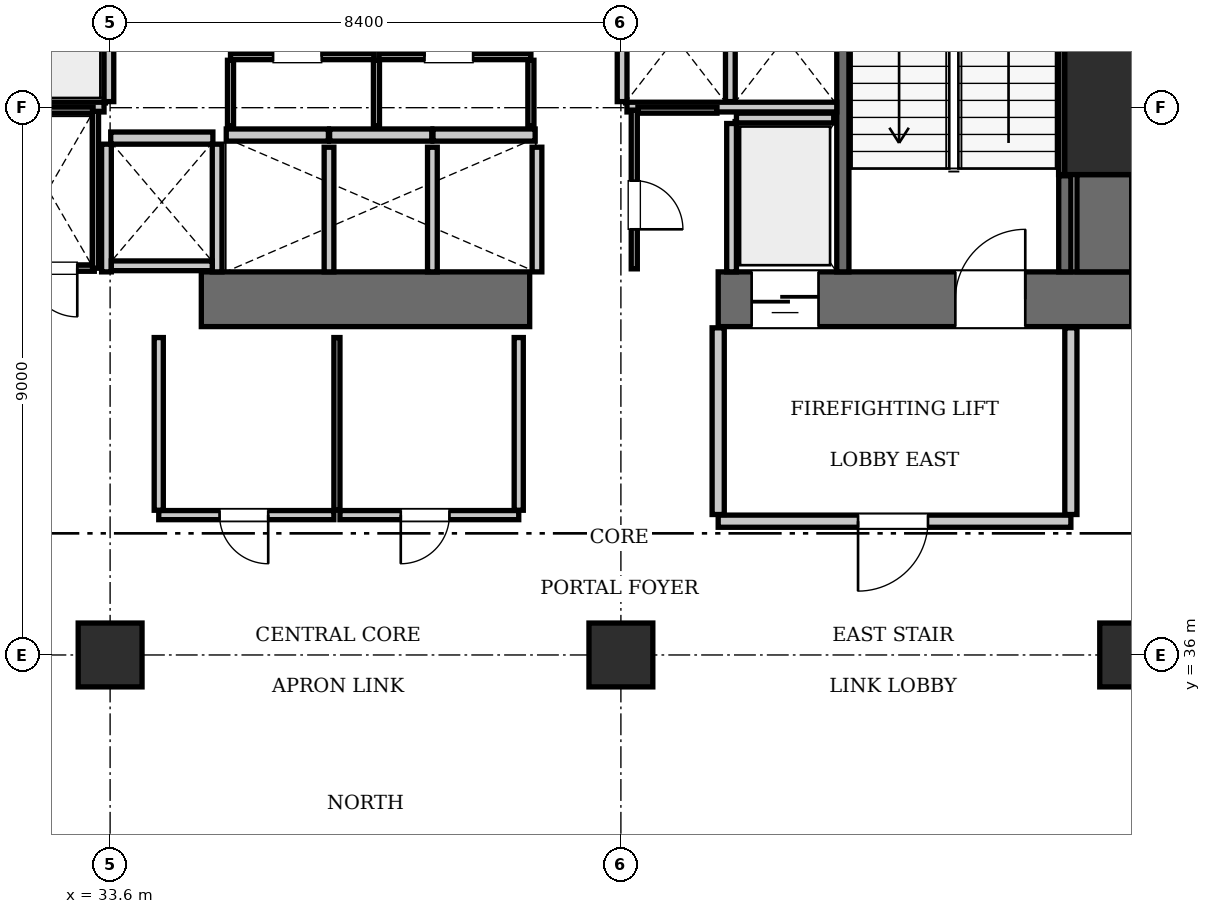
"""IFC4 building model, lengths in metres.
Left out: names, types, materials, properties, quantities, classifications, styles, units other than length and angle.
Written with IfcOpenShell. Run it as: python <this file> out.ifc"""

import sys

from ifc_helpers import new_model, si_unit, direction, frame, frame_2d, origin, origin_2d, place, context, subcontext, project, spatial, rectangle, extrude, element, fill, save


model = new_model("IFC4")
c1 = context("Model", 3, precision=1e-05, world=origin(), true_north=direction((0.0, 1.0)))
c2 = subcontext(c1, "Body", "Model", "MODEL_VIEW")
j1 = project(units=[si_unit("LENGTHUNIT", "METRE"), si_unit("PLANEANGLEUNIT", "RADIAN")], contexts=[c1])
p1 = place(None, origin())
s1 = spatial("IfcSite", under=j1, at=p1, CompositionType="ELEMENT")
p2 = place(p1, origin())
s2 = spatial("IfcBuilding", under=s1, at=p2, CompositionType="ELEMENT")
p3 = place(p2, frame((0.0, 0.0, 96.25)))
s3 = spatial("IfcBuildingStorey", under=s2, at=p3, CompositionType="ELEMENT", Elevation=96.25)
p4 = place(p3, frame((50.4, 45.0, 0.0), z_axis=(0.0, 0.0, 1.0), x_axis=(1.0, 0.0, 0.0)))
e1 = element("IfcColumn", 1, at=p4, inside=s3, PredefinedType="COLUMN", context=c2, shape_type="SweptSolid", body=[
    extrude(rectangle(XDim=2.2, YDim=2.2, at=origin_2d()), origin(), (0.0, 0.0, 1.0), 3.85),
])
p5 = place(p3, frame((35.1, 41.85, 0.0), z_axis=(0.0, 0.0, 1.0), x_axis=(1.0, 0.0, 0.0)))
e2 = element("IfcWall", 2, at=p5, inside=s3, PredefinedType="SHEAR", context=c2, shape_type="SweptSolid", body=[
    extrude(rectangle(XDim=5.4, YDim=0.9, at=frame_2d((2.7, 0.0))), origin(), (0.0, 0.0, 1.0), 3.85),
])
p6 = place(p3, frame((43.6, 41.85, 0.0), z_axis=(0.0, 0.0, 1.0), x_axis=(1.0, 0.0, 0.0)))
e3 = element("IfcWall", 3, at=p6, inside=s3, PredefinedType="SHEAR", context=c2, shape_type="SweptSolid", body=[
    extrude(rectangle(XDim=6.8, YDim=0.9, at=frame_2d((3.4, 0.0))), origin(), (0.0, 0.0, 1.0), 3.85),
])
p7 = place(p6, frame((3.9, 0.0, 0.0)))
e4 = element("IfcOpeningElement", 4, at=p7, cuts=e3, PredefinedType="OPENING", context=c2, shape_type="SweptSolid", body=[
    extrude(rectangle(XDim=1.15, YDim=2.15, at=frame_2d((0.575, 1.075))), frame((0.0, 0.46, 0.0), z_axis=(0.0, -1.0, 0.0), x_axis=(1.0, 0.0, 0.0)), (0.0, 0.0, 1.0), 0.92),
])
p8 = place(p6, frame((0.55, 0.0, 0.0)))
e5 = element("IfcOpeningElement", 5, at=p8, cuts=e3, PredefinedType="OPENING", context=c2, shape_type="SweptSolid", body=[
    extrude(rectangle(XDim=1.1, YDim=2.2, at=frame_2d((0.55, 1.1))), frame((0.0, 0.46, 0.0), z_axis=(0.0, -1.0, 0.0), x_axis=(1.0, 0.0, 0.0)), (0.0, 0.0, 1.0), 0.92),
])
p9 = place(p3, frame((49.95, 42.3, 0.0), z_axis=(0.0, 0.0, 1.0), x_axis=(0.0, 1.0, 0.0)))
e6 = element("IfcWall", 6, at=p9, inside=s3, PredefinedType="SHEAR", context=c2, shape_type="SweptSolid", body=[
    extrude(rectangle(XDim=1.6, YDim=0.9, at=frame_2d((0.8, 0.0))), origin(), (0.0, 0.0, 1.0), 3.85),
])
for number, where, z_axis, x_axis in (
    (7, (33.6, 36.0, 0.0), (0.0, 0.0, 1.0), (1.0, 0.0, 0.0)),
    (8, (42.0, 36.0, 0.0), (0.0, 0.0, 1.0), (1.0, 0.0, 0.0)),
    (9, (50.4, 36.0, 0.0), (0.0, 0.0, 1.0), (1.0, 0.0, 0.0)),
):
    element("IfcColumn", number, at=place(p3, frame(where, z_axis=z_axis, x_axis=x_axis)), inside=s3, PredefinedType="COLUMN", context=c2, shape_type="SweptSolid", body=[
        extrude(rectangle(XDim=1.05, YDim=1.05, at=origin_2d()), origin(), (0.0, 0.0, 1.0), 3.85),
    ])
p10 = place(p3, frame((45.65, 42.3, 0.0), z_axis=(0.0, 0.0, 1.0), x_axis=(0.0, 1.0, 0.0)))
e10 = element("IfcWall", 10, at=p10, inside=s3, PredefinedType="SOLIDWALL", context=c2, shape_type="SweptSolid", body=[
    extrude(rectangle(XDim=8.85, YDim=0.2, at=frame_2d((4.425, 0.0))), origin(), (0.0, 0.0, 1.0), 3.61),
])
p11 = place(p3, frame((49.3, 42.3, 0.0), z_axis=(0.0, 0.0, 1.0), x_axis=(0.0, 1.0, 0.0)))
e11 = element("IfcWall", 11, at=p11, inside=s3, PredefinedType="SOLIDWALL", context=c2, shape_type="SweptSolid", body=[
    extrude(rectangle(XDim=1.58, YDim=0.2, at=frame_2d((0.79, 0.0))), origin(), (0.0, 0.0, 1.0), 3.61),
])
p12 = place(p3, frame((49.248, 43.9, 0.0), z_axis=(0.0, 0.0, 1.0), x_axis=(0.0, 1.0, 0.0)))
e12 = element("IfcWall", 12, at=p12, inside=s3, PredefinedType="SOLIDWALL", context=c2, shape_type="SweptSolid", body=[
    extrude(rectangle(XDim=2.2, YDim=0.1, at=frame_2d((1.1, 0.0))), origin(), (0.0, 0.0, 1.0), 3.61),
])
for number, where, z_axis, x_axis in (
    (13, (35.51, 44.55, 0.0), (0.0, 0.0, 1.0), (1.0, 0.0, 0.0)),
    (14, (37.21, 44.55, 0.0), (0.0, 0.0, 1.0), (1.0, 0.0, 0.0)),
):
    element("IfcWall", number, at=place(p3, frame(where, z_axis=z_axis, x_axis=x_axis)), inside=s3, PredefinedType="SOLIDWALL", context=c2, shape_type="SweptSolid", body=[
        extrude(rectangle(XDim=1.68, YDim=0.2, at=frame_2d((0.84, 0.0))), origin(), (0.0, 0.0, 1.0), 3.61),
    ])
p13 = place(p3, frame((38.91, 44.55, 0.0), z_axis=(0.0, 0.0, 1.0), x_axis=(1.0, 0.0, 0.0)))
e15 = element("IfcWall", 15, at=p13, inside=s3, PredefinedType="SOLIDWALL", context=c2, shape_type="SweptSolid", body=[
    extrude(rectangle(XDim=1.68, YDim=0.2, at=frame_2d((0.84, 0.0))), origin(), (0.0, 0.0, 1.0), 3.61),
])
p14 = place(p3, frame((33.61, 44.5, 0.0), z_axis=(0.0, 0.0, 1.0), x_axis=(1.0, 0.0, 0.0)))
e16 = element("IfcWall", 16, at=p14, inside=s3, PredefinedType="SOLIDWALL", context=c2, shape_type="SweptSolid", body=[
    extrude(rectangle(XDim=1.68, YDim=0.2, at=frame_2d((0.84, 0.0))), origin(), (0.0, 0.0, 1.0), 3.61),
])
p15 = place(p3, frame((43.9, 44.83, 0.0), z_axis=(0.0, 0.0, 1.0), x_axis=(1.0, 0.0, 0.0)))
e17 = element("IfcWall", 17, at=p15, inside=s3, PredefinedType="SOLIDWALL", context=c2, shape_type="SweptSolid", body=[
    extrude(rectangle(XDim=1.6, YDim=0.16, at=frame_2d((0.8, 0.0))), origin(), (0.0, 0.0, 1.0), 3.61),
])
p16 = place(p3, frame((43.82, 42.3, 0.0), z_axis=(0.0, 0.0, 1.0), x_axis=(0.0, 1.0, 0.0)))
e18 = element("IfcWall", 18, at=p16, inside=s3, PredefinedType="SOLIDWALL", context=c2, shape_type="SweptSolid", body=[
    extrude(rectangle(XDim=2.44, YDim=0.16, at=frame_2d((1.22, 0.0))), origin(), (0.0, 0.0, 1.0), 3.61),
])
p17 = place(p3, frame((33.58, 45.1, 0.0), z_axis=(0.0, 0.0, 1.0), x_axis=(0.0, 1.0, 0.0)))
e19 = element("IfcWall", 19, at=p17, inside=s3, PredefinedType="SOLIDWALL", context=c2, shape_type="SweptSolid", body=[
    extrude(rectangle(XDim=1.95, YDim=0.16, at=frame_2d((0.975, 0.0))), origin(), (0.0, 0.0, 1.0), 3.61),
])
p18 = place(p3, frame((30.05, 45.01, 0.0), z_axis=(0.0, 0.0, 1.0), x_axis=(1.0, 0.0, 0.0)))
e20 = element("IfcWall", 20, at=p18, inside=s3, PredefinedType="SOLIDWALL", context=c2, shape_type="SweptSolid", body=[
    extrude(rectangle(XDim=3.45, YDim=0.16, at=frame_2d((1.725, 0.0))), origin(), (0.0, 0.0, 1.0), 3.61),
])
for number, where, z_axis, x_axis in (
    (21, (42.02, 45.1, 0.0), (0.0, 0.0, 1.0), (0.0, 1.0, 0.0)),
    (22, (43.8, 45.1, 0.0), (0.0, 0.0, 1.0), (0.0, 1.0, 0.0)),
):
    element("IfcWall", number, at=place(p3, frame(where, z_axis=z_axis, x_axis=x_axis)), inside=s3, PredefinedType="SOLIDWALL", context=c2, shape_type="SweptSolid", body=[
        extrude(rectangle(XDim=1.95, YDim=0.16, at=frame_2d((0.975, 0.0))), origin(), (0.0, 0.0, 1.0), 3.61),
    ])
p19 = place(p3, frame((42.1, 45.01, 0.0), z_axis=(0.0, 0.0, 1.0), x_axis=(1.0, 0.0, 0.0)))
e23 = element("IfcWall", 23, at=p19, inside=s3, PredefinedType="SOLIDWALL", context=c2, shape_type="SweptSolid", body=[
    extrude(rectangle(XDim=3.45, YDim=0.16, at=frame_2d((1.725, 0.0))), origin(), (0.0, 0.0, 1.0), 3.61),
])
for number, where, z_axis, x_axis in (
    (24, (37.2, 42.3, 0.0), (0.0, 0.0, 1.0), (0.0, 1.0, 0.0)),
    (25, (38.9, 42.3, 0.0), (0.0, 0.0, 1.0), (0.0, 1.0, 0.0)),
    (26, (40.62, 42.3, 0.0), (0.0, 0.0, 1.0), (0.0, 1.0, 0.0)),
):
    element("IfcWall", number, at=place(p3, frame(where, z_axis=z_axis, x_axis=x_axis)), inside=s3, PredefinedType="SOLIDWALL", context=c2, shape_type="SweptSolid", body=[
        extrude(rectangle(XDim=2.05, YDim=0.16, at=frame_2d((1.025, 0.0))), origin(), (0.0, 0.0, 1.0), 3.61),
    ])
for number, where, z_axis, x_axis in (
    (27, (33.54, 42.3, 0.0), (0.0, 0.0, 1.0), (0.0, 1.0, 0.0)),
    (28, (35.36, 42.3, 0.0), (0.0, 0.0, 1.0), (0.0, 1.0, 0.0)),
):
    element("IfcWall", number, at=place(p3, frame(where, z_axis=z_axis, x_axis=x_axis)), inside=s3, PredefinedType="SOLIDWALL", context=c2, shape_type="SweptSolid", body=[
        extrude(rectangle(XDim=2.1, YDim=0.16, at=frame_2d((1.05, 0.0))), origin(), (0.0, 0.0, 1.0), 3.61),
    ])
p20 = place(p3, frame((33.62, 42.4, 0.0), z_axis=(0.0, 0.0, 1.0), x_axis=(1.0, 0.0, 0.0)))
e29 = element("IfcWall", 29, at=p20, inside=s3, PredefinedType="SOLIDWALL", context=c2, shape_type="SweptSolid", body=[
    extrude(rectangle(XDim=1.66, YDim=0.16, at=frame_2d((0.83, 0.0))), origin(), (0.0, 0.0, 1.0), 3.61),
])
p21 = place(p3, frame((43.6, 38.2, 0.0), z_axis=(0.0, 0.0, 1.0), x_axis=(1.0, 0.0, 0.0)))
e30 = element("IfcWall", 30, at=p21, inside=s3, PredefinedType="PARTITIONING", context=c2, shape_type="SweptSolid", body=[
    extrude(rectangle(XDim=5.8, YDim=0.2, at=frame_2d((2.9, 0.0))), origin(), (0.0, 0.0, 1.0), 3.61),
])
p22 = place(p21, frame((2.3, 0.0, 0.0)))
e31 = element("IfcOpeningElement", 31, at=p22, cuts=e30, PredefinedType="OPENING", context=c2, shape_type="SweptSolid", body=[
    extrude(rectangle(XDim=1.15, YDim=2.15, at=frame_2d((0.575, 1.075))), frame((0.0, 0.11, 0.0), z_axis=(0.0, -1.0, 0.0), x_axis=(1.0, 0.0, 0.0)), (0.0, 0.0, 1.0), 0.22),
])
for number, where, z_axis, x_axis in (
    (32, (43.6, 38.31, 0.0), (0.0, 0.0, 1.0), (0.0, 1.0, 0.0)),
    (33, (49.4, 38.31, 0.0), (0.0, 0.0, 1.0), (0.0, 1.0, 0.0)),
):
    element("IfcWall", number, at=place(p3, frame(where, z_axis=z_axis, x_axis=x_axis)), inside=s3, PredefinedType="PARTITIONING", context=c2, shape_type="SweptSolid", body=[
        extrude(rectangle(XDim=3.07, YDim=0.2, at=frame_2d((1.535, 0.0))), origin(), (0.0, 0.0, 1.0), 3.61),
    ])
p23 = place(p3, frame((32.02, 42.36, 0.0), z_axis=(0.0, 0.0, 1.0), x_axis=(1.0, 0.0, 0.0)))
e34 = element("IfcWall", 34, at=p23, inside=s3, PredefinedType="PARTITIONING", context=c2, shape_type="SweptSolid", body=[
    extrude(rectangle(XDim=1.32, YDim=0.1, at=frame_2d((0.66, 0.0))), origin(), (0.0, 0.0, 1.0), 3.61),
])
p24 = place(p23, frame((0.24, 0.0, 0.0)))
e35 = element("IfcOpeningElement", 35, at=p24, cuts=e34, PredefinedType="OPENING", context=c2, shape_type="SweptSolid", body=[
    extrude(rectangle(XDim=0.8, YDim=2.05, at=frame_2d((0.4, 1.025))), frame((0.0, 0.06, 0.0), z_axis=(0.0, -1.0, 0.0), x_axis=(1.0, 0.0, 0.0)), (0.0, 0.0, 1.0), 0.12),
])
p25 = place(p3, frame((31.84, 44.96, 0.0), z_axis=(0.0, 0.0, 1.0), x_axis=(1.0, 0.0, 0.0)))
e36 = element("IfcWall", 36, at=p25, inside=s3, PredefinedType="PARTITIONING", context=c2, shape_type="SweptSolid", body=[
    extrude(rectangle(XDim=1.48, YDim=0.1, at=frame_2d((0.74, 0.0))), origin(), (0.0, 0.0, 1.0), 3.61),
])
p26 = place(p3, frame((33.36, 42.36, 0.0), z_axis=(0.0, 0.0, 1.0), x_axis=(0.0, 1.0, 0.0)))
e37 = element("IfcWall", 37, at=p26, inside=s3, PredefinedType="PARTITIONING", context=c2, shape_type="SweptSolid", body=[
    extrude(rectangle(XDim=2.58, YDim=0.1, at=frame_2d((1.29, 0.0))), origin(), (0.0, 0.0, 1.0), 3.61),
])
p27 = place(p3, frame((35.58, 45.84, 0.0), z_axis=(0.0, 0.0, 1.0), x_axis=(1.0, 0.0, 0.0)))
e38 = element("IfcWall", 38, at=p27, inside=s3, PredefinedType="PARTITIONING", context=c2, shape_type="SweptSolid", body=[
    extrude(rectangle(XDim=2.36, YDim=0.1, at=frame_2d((1.18, 0.0))), origin(), (0.0, 0.0, 1.0), 3.61),
])
p28 = place(p27, frame((0.7, 0.0, 0.0)))
e39 = element("IfcOpeningElement", 39, at=p28, cuts=e38, PredefinedType="OPENING", context=c2, shape_type="SweptSolid", body=[
    extrude(rectangle(XDim=0.8, YDim=2.05, at=frame_2d((0.4, 1.025))), frame((0.0, 0.06, 0.0), z_axis=(0.0, -1.0, 0.0), x_axis=(1.0, 0.0, 0.0)), (0.0, 0.0, 1.0), 0.12),
])
p29 = place(p3, frame((38.02, 45.84, 0.0), z_axis=(0.0, 0.0, 1.0), x_axis=(1.0, 0.0, 0.0)))
e40 = element("IfcWall", 40, at=p29, inside=s3, PredefinedType="PARTITIONING", context=c2, shape_type="SweptSolid", body=[
    extrude(rectangle(XDim=2.5, YDim=0.1, at=frame_2d((1.25, 0.0))), origin(), (0.0, 0.0, 1.0), 3.61),
])
p30 = place(p29, frame((0.75, 0.0, 0.0)))
e41 = element("IfcOpeningElement", 41, at=p30, cuts=e40, PredefinedType="OPENING", context=c2, shape_type="SweptSolid", body=[
    extrude(rectangle(XDim=0.8, YDim=2.05, at=frame_2d((0.4, 1.025))), frame((0.0, 0.06, 0.0), z_axis=(0.0, -1.0, 0.0), x_axis=(1.0, 0.0, 0.0)), (0.0, 0.0, 1.0), 0.12),
])
for number, where, z_axis, x_axis in (
    (42, (35.58, 44.7, 0.0), (0.0, 0.0, 1.0), (0.0, 1.0, 0.0)),
    (43, (37.98, 44.7, 0.0), (0.0, 0.0, 1.0), (0.0, 1.0, 0.0)),
    (44, (40.52, 44.7, 0.0), (0.0, 0.0, 1.0), (0.0, 1.0, 0.0)),
):
    element("IfcWall", number, at=place(p3, frame(where, z_axis=z_axis, x_axis=x_axis)), inside=s3, PredefinedType="PARTITIONING", context=c2, shape_type="SweptSolid", body=[
        extrude(rectangle(XDim=1.08, YDim=0.1, at=frame_2d((0.54, 0.0))), origin(), (0.0, 0.0, 1.0), 3.61),
    ])
p31 = place(p3, frame((42.22, 42.35, 0.0), z_axis=(0.0, 0.0, 1.0), x_axis=(0.0, 1.0, 0.0)))
e45 = element("IfcWall", 45, at=p31, inside=s3, PredefinedType="PARTITIONING", context=c2, shape_type="SweptSolid", body=[
    extrude(rectangle(XDim=2.61, YDim=0.1, at=frame_2d((1.305, 0.0))), origin(), (0.0, 0.0, 1.0), 3.61),
])
p32 = place(p31, frame((0.65, 0.0, 0.0)))
e46 = element("IfcOpeningElement", 46, at=p32, cuts=e45, PredefinedType="OPENING", context=c2, shape_type="SweptSolid", body=[
    extrude(rectangle(XDim=0.8, YDim=2.05, at=frame_2d((0.4, 1.025))), frame((0.0, 0.06, 0.0), z_axis=(0.0, -1.0, 0.0), x_axis=(1.0, 0.0, 0.0)), (0.0, 0.0, 1.0), 0.12),
])
p33 = place(p3, frame((42.28, 44.96, 0.0), z_axis=(0.0, 0.0, 1.0), x_axis=(1.0, 0.0, 0.0)))
e47 = element("IfcWall", 47, at=p33, inside=s3, PredefinedType="PARTITIONING", context=c2, shape_type="SweptSolid", body=[
    extrude(rectangle(XDim=1.3, YDim=0.1, at=frame_2d((0.65, 0.0))), origin(), (0.0, 0.0, 1.0), 3.61),
])
p34 = place(p3, frame((34.4, 38.3, 0.0), z_axis=(0.0, 0.0, 1.0), x_axis=(1.0, 0.0, 0.0)))
e48 = element("IfcWall", 48, at=p34, inside=s3, PredefinedType="PARTITIONING", context=c2, shape_type="SweptSolid", body=[
    extrude(rectangle(XDim=2.88, YDim=0.15, at=frame_2d((1.44, 0.0))), origin(), (0.0, 0.0, 1.0), 3.61),
])
p35 = place(p34, frame((1.0, 0.0, 0.0)))
e49 = element("IfcOpeningElement", 49, at=p35, cuts=e48, PredefinedType="OPENING", context=c2, shape_type="SweptSolid", body=[
    extrude(rectangle(XDim=0.8, YDim=2.05, at=frame_2d((0.4, 1.025))), frame((0.0, 0.085, 0.0), z_axis=(0.0, -1.0, 0.0), x_axis=(1.0, 0.0, 0.0)), (0.0, 0.0, 1.0), 0.17),
])
p36 = place(p3, frame((37.38, 38.3, 0.0), z_axis=(0.0, 0.0, 1.0), x_axis=(1.0, 0.0, 0.0)))
e50 = element("IfcWall", 50, at=p36, inside=s3, PredefinedType="PARTITIONING", context=c2, shape_type="SweptSolid", body=[
    extrude(rectangle(XDim=2.94, YDim=0.15, at=frame_2d((1.47, 0.0))), origin(), (0.0, 0.0, 1.0), 3.61),
])
p37 = place(p36, frame((1.0, 0.0, 0.0)))
e51 = element("IfcOpeningElement", 51, at=p37, cuts=e50, PredefinedType="OPENING", context=c2, shape_type="SweptSolid", body=[
    extrude(rectangle(XDim=0.8, YDim=2.05, at=frame_2d((0.4, 1.025))), frame((0.0, 0.085, 0.0), z_axis=(0.0, -1.0, 0.0), x_axis=(1.0, 0.0, 0.0)), (0.0, 0.0, 1.0), 0.17),
])
p38 = place(p3, frame((34.4, 38.38, 0.0), z_axis=(0.0, 0.0, 1.0), x_axis=(0.0, 1.0, 0.0)))
e52 = element("IfcWall", 52, at=p38, inside=s3, PredefinedType="PARTITIONING", context=c2, shape_type="SweptSolid", body=[
    extrude(rectangle(XDim=2.84, YDim=0.15, at=frame_2d((1.42, 0.0))), origin(), (0.0, 0.0, 1.0), 3.61),
])
p39 = place(p3, frame((37.33, 38.38, 0.0), z_axis=(0.0, 0.0, 1.0), x_axis=(0.0, 1.0, 0.0)))
e53 = element("IfcWall", 53, at=p39, inside=s3, PredefinedType="PARTITIONING", context=c2, shape_type="SweptSolid", body=[
    extrude(rectangle(XDim=2.84, YDim=0.1, at=frame_2d((1.42, 0.0))), origin(), (0.0, 0.0, 1.0), 3.61),
])
p40 = place(p3, frame((40.32, 38.38, 0.0), z_axis=(0.0, 0.0, 1.0), x_axis=(0.0, 1.0, 0.0)))
e54 = element("IfcWall", 54, at=p40, inside=s3, PredefinedType="PARTITIONING", context=c2, shape_type="SweptSolid", body=[
    extrude(rectangle(XDim=2.84, YDim=0.15, at=frame_2d((1.42, 0.0))), origin(), (0.0, 0.0, 1.0), 3.61),
])
p41 = place(p7, origin())
e55 = element("IfcDoor", 55, at=p41, inside=s3, OperationType="SINGLE_SWING_RIGHT", PredefinedType="DOOR", context=c2, shape_type="SweptSolid", body=[
    extrude(rectangle(XDim=1.15, YDim=2.15, at=frame_2d((0.575, 1.075))), frame((0.0, 0.025, 0.0), z_axis=(0.0, -1.0, 0.0), x_axis=(1.0, 0.0, 0.0)), (0.0, 0.0, 1.0), 0.05),
])
fill(e4, e55)
p42 = place(p8, frame((1.1, 0.0, 0.0), z_axis=(0.0, 0.0, 1.0), x_axis=(-1.0, 0.0, 0.0)))
e56 = element("IfcDoor", 56, at=p42, inside=s3, OperationType="SLIDING_TO_LEFT", PredefinedType="DOOR", context=c2, shape_type="SweptSolid", body=[
    extrude(rectangle(XDim=1.1, YDim=2.2, at=frame_2d((0.55, 1.1))), frame((0.0, 0.025, 0.0), z_axis=(0.0, -1.0, 0.0), x_axis=(1.0, 0.0, 0.0)), (0.0, 0.0, 1.0), 0.05),
])
fill(e5, e56)
p43 = place(p22, frame((1.15, 0.0, 0.0), z_axis=(0.0, 0.0, 1.0), x_axis=(-1.0, 0.0, 0.0)))
e57 = element("IfcDoor", 57, at=p43, inside=s3, OperationType="SINGLE_SWING_RIGHT", PredefinedType="DOOR", context=c2, shape_type="SweptSolid", body=[
    extrude(rectangle(XDim=1.15, YDim=2.15, at=frame_2d((0.575, 1.075))), frame((0.0, 0.025, 0.0), z_axis=(0.0, -1.0, 0.0), x_axis=(1.0, 0.0, 0.0)), (0.0, 0.0, 1.0), 0.05),
])
fill(e31, e57)
p44 = place(p24, frame((0.8, 0.0, 0.0), z_axis=(0.0, 0.0, 1.0), x_axis=(-1.0, 0.0, 0.0)))
e58 = element("IfcDoor", 58, at=p44, inside=s3, OperationType="SINGLE_SWING_LEFT", PredefinedType="DOOR", context=c2, shape_type="SweptSolid", body=[
    extrude(rectangle(XDim=0.8, YDim=2.05, at=frame_2d((0.4, 1.025))), frame((0.0, 0.025, 0.0), z_axis=(0.0, -1.0, 0.0), x_axis=(1.0, 0.0, 0.0)), (0.0, 0.0, 1.0), 0.05),
])
fill(e35, e58)
p45 = place(p28, origin())
e59 = element("IfcDoor", 59, at=p45, inside=s3, OperationType="SINGLE_SWING_RIGHT", PredefinedType="DOOR", context=c2, shape_type="SweptSolid", body=[
    extrude(rectangle(XDim=0.8, YDim=2.05, at=frame_2d((0.4, 1.025))), frame((0.0, 0.025, 0.0), z_axis=(0.0, -1.0, 0.0), x_axis=(1.0, 0.0, 0.0)), (0.0, 0.0, 1.0), 0.05),
])
fill(e39, e59)
p46 = place(p30, origin())
e60 = element("IfcDoor", 60, at=p46, inside=s3, OperationType="SINGLE_SWING_LEFT", PredefinedType="DOOR", context=c2, shape_type="SweptSolid", body=[
    extrude(rectangle(XDim=0.8, YDim=2.05, at=frame_2d((0.4, 1.025))), frame((0.0, 0.025, 0.0), z_axis=(0.0, -1.0, 0.0), x_axis=(1.0, 0.0, 0.0)), (0.0, 0.0, 1.0), 0.05),
])
fill(e41, e60)
p47 = place(p32, frame((0.8, 0.0, 0.0), z_axis=(0.0, 0.0, 1.0), x_axis=(-1.0, 0.0, 0.0)))
e61 = element("IfcDoor", 61, at=p47, inside=s3, OperationType="SINGLE_SWING_RIGHT", PredefinedType="DOOR", context=c2, shape_type="SweptSolid", body=[
    extrude(rectangle(XDim=0.8, YDim=2.05, at=frame_2d((0.4, 1.025))), frame((0.0, 0.025, 0.0), z_axis=(0.0, -1.0, 0.0), x_axis=(1.0, 0.0, 0.0)), (0.0, 0.0, 1.0), 0.05),
])
fill(e46, e61)
p48 = place(p35, frame((0.8, 0.0, 0.0), z_axis=(0.0, 0.0, 1.0), x_axis=(-1.0, 0.0, 0.0)))
e62 = element("IfcDoor", 62, at=p48, inside=s3, OperationType="SINGLE_SWING_LEFT", PredefinedType="DOOR", context=c2, shape_type="SweptSolid", body=[
    extrude(rectangle(XDim=0.8, YDim=2.05, at=frame_2d((0.4, 1.025))), frame((0.0, 0.025, 0.0), z_axis=(0.0, -1.0, 0.0), x_axis=(1.0, 0.0, 0.0)), (0.0, 0.0, 1.0), 0.05),
])
fill(e49, e62)
p49 = place(p37, frame((0.8, 0.0, 0.0), z_axis=(0.0, 0.0, 1.0), x_axis=(-1.0, 0.0, 0.0)))
e63 = element("IfcDoor", 63, at=p49, inside=s3, OperationType="SINGLE_SWING_RIGHT", PredefinedType="DOOR", context=c2, shape_type="SweptSolid", body=[
    extrude(rectangle(XDim=0.8, YDim=2.05, at=frame_2d((0.4, 1.025))), frame((0.0, 0.025, 0.0), z_axis=(0.0, -1.0, 0.0), x_axis=(1.0, 0.0, 0.0)), (0.0, 0.0, 1.0), 0.05),
])
fill(e51, e63)
save(model, sys.argv[1])
